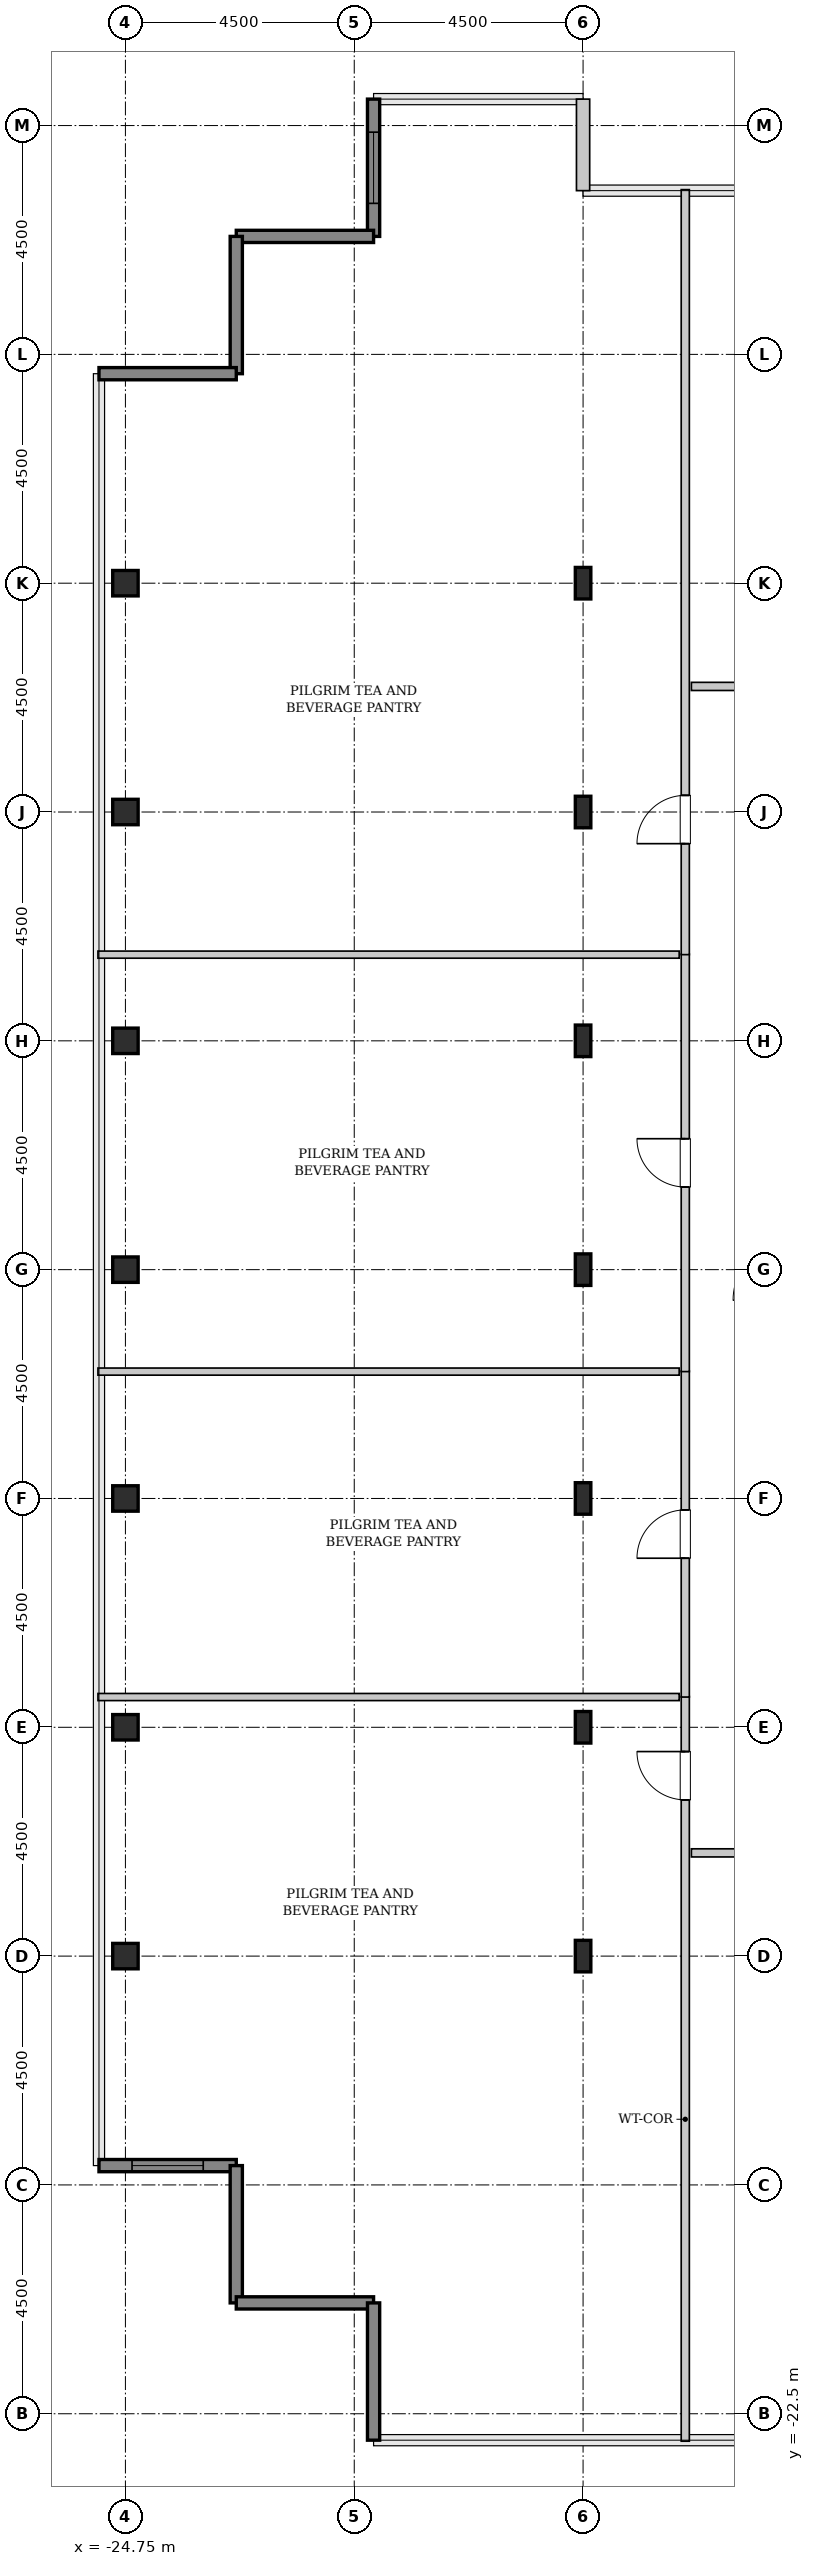
"""IFC4 building model, lengths in metres.
Left out: names, types, materials, properties, quantities, classifications, styles, units other than length and angle.
Written with IfcOpenShell. Run it as: python <this file> out.ifc"""

import sys

from ifc_helpers import new_model, si_unit, direction, frame, frame_2d, origin, origin_2d, place, context, subcontext, project, spatial, rectangle, hollow_rectangle, i_section, extrude, source, transform, mapped, element, fill, save


model = new_model("IFC4")
c1 = context("Model", 3, precision=1e-05, world=origin(), true_north=direction((0.0, 1.0)))
c2 = subcontext(c1, "Body", "Model", "MODEL_VIEW")
j1 = project(units=[si_unit("LENGTHUNIT", "METRE"), si_unit("PLANEANGLEUNIT", "RADIAN")], contexts=[c1])
p1 = place(None, origin())
s1 = spatial("IfcSite", under=j1, at=p1, CompositionType="ELEMENT")
p2 = place(p1, origin())
s2 = spatial("IfcBuilding", under=s1, at=p2, CompositionType="ELEMENT")
p3 = place(p2, frame((0.0, 0.0, 326.2)))
s3 = spatial("IfcBuildingStorey", under=s2, at=p3, CompositionType="ELEMENT", Elevation=326.2)
m1 = source(origin(), c2, "Body", "SweptSolid", [
    extrude(hollow_rectangle(XDim=0.5, YDim=0.5, WallThickness=0.025, InnerFilletRadius=0.025, OuterFilletRadius=0.05, at=origin_2d()), origin(), (0.0, 0.0, 1.0), 3.8),
])
for number, where, z_axis, x_axis in (
    (1, (-24.75, -13.5, 0.0), (0.0, 0.0, 1.0), (1.0, 0.0, 0.0)),
    (2, (-24.75, -9.0, 0.0), (0.0, 0.0, 1.0), (1.0, 0.0, 0.0)),
    (3, (-24.75, -4.5, 0.0), (0.0, 0.0, 1.0), (1.0, 0.0, 0.0)),
    (4, (-24.75, 0.0, 0.0), (0.0, 0.0, 1.0), (1.0, 0.0, 0.0)),
    (5, (-24.75, 4.5, 0.0), (0.0, 0.0, 1.0), (1.0, 0.0, 0.0)),
    (6, (-24.75, 9.0, 0.0), (0.0, 0.0, 1.0), (1.0, 0.0, 0.0)),
    (7, (-24.75, 13.5, 0.0), (0.0, 0.0, 1.0), (1.0, 0.0, 0.0)),
):
    element("IfcColumn", number, at=place(p3, frame(where, z_axis=z_axis, x_axis=x_axis)), inside=s3, PredefinedType="COLUMN", context=c2, shape_type="MappedRepresentation", body=[
        mapped(m1, transform((0.0, 0.0, 0.0), x_axis=(1.0, 0.0, 0.0), y_axis=(0.0, 1.0, 0.0), z_axis=(0.0, 0.0, 1.0), scale=1.0)),
    ])
m2 = source(origin(), c2, "Body", "SweptSolid", [
    extrude(i_section(OverallWidth=0.305, OverallDepth=0.62, WebThickness=0.021, FlangeThickness=0.04, FilletRadius=0.027, at=origin_2d()), origin(), (0.0, 0.0, 1.0), 3.8),
])
for number, where, z_axis, x_axis in (
    (8, (-15.75, -13.5, 0.0), (0.0, 0.0, 1.0), (1.0, 0.0, 0.0)),
    (9, (-15.75, -9.0, 0.0), (0.0, 0.0, 1.0), (1.0, 0.0, 0.0)),
    (10, (-15.75, -4.5, 0.0), (0.0, 0.0, 1.0), (1.0, 0.0, 0.0)),
    (11, (-15.75, 0.0, 0.0), (0.0, 0.0, 1.0), (1.0, 0.0, 0.0)),
    (12, (-15.75, 4.5, 0.0), (0.0, 0.0, 1.0), (1.0, 0.0, 0.0)),
    (13, (-15.75, 9.0, 0.0), (0.0, 0.0, 1.0), (1.0, 0.0, 0.0)),
    (14, (-15.75, 13.5, 0.0), (0.0, 0.0, 1.0), (1.0, 0.0, 0.0)),
):
    element("IfcColumn", number, at=place(p3, frame(where, z_axis=z_axis, x_axis=x_axis)), inside=s3, PredefinedType="COLUMN", context=c2, shape_type="MappedRepresentation", body=[
        mapped(m2, transform((0.0, 0.0, 0.0), x_axis=(1.0, 0.0, 0.0), y_axis=(0.0, 1.0, 0.0), z_axis=(0.0, 0.0, 1.0), scale=1.0)),
    ])
m3 = source(origin(), c2, "Body", "SweptSolid", [
    extrude(rectangle(XDim=1.8, YDim=0.26, at=frame_2d((0.9, 0.0))), origin(), (0.0, 0.0, 1.0), 3.55),
])
p4 = place(p3, frame((-15.75, 21.22, 0.0), z_axis=(0.0, 0.0, 1.0), x_axis=(0.0, 1.0, 0.0)))
e15 = element("IfcWall", 15, at=p4, inside=s3, PredefinedType="SOLIDWALL", context=c2, shape_type="MappedRepresentation", body=[
    mapped(m3, transform((0.0, 0.0, 0.0), x_axis=(1.0, 0.0, 0.0), y_axis=(0.0, 1.0, 0.0), z_axis=(0.0, 0.0, 1.0), scale=1.0)),
])
m4 = source(origin(), c2, "Body", "SweptSolid", [
    extrude(rectangle(XDim=2.7, YDim=0.24, at=frame_2d((1.35, 0.0))), origin(), (0.0, 0.0, 1.0), 3.55),
])
p5 = place(p3, frame((-19.87, 23.02, 0.0), z_axis=(0.0, 0.0, 1.0), x_axis=(0.0, -1.0, 0.0)))
e16 = element("IfcWall", 16, at=p5, inside=s3, PredefinedType="SHEAR", context=c2, shape_type="MappedRepresentation", body=[
    mapped(m4, transform((0.0, 0.0, 0.0), x_axis=(1.0, 0.0, 0.0), y_axis=(0.0, 1.0, 0.0), z_axis=(0.0, 0.0, 1.0), scale=1.0)),
])
p6 = place(p5, frame((0.65, 0.0, 0.85)))
e17 = element("IfcOpeningElement", 17, at=p6, cuts=e16, PredefinedType="OPENING", context=c2, shape_type="SweptSolid", body=[
    extrude(rectangle(XDim=1.4, YDim=1.8, at=frame_2d((0.7, 0.9))), frame((0.0, 0.13, 0.0), z_axis=(0.0, -1.0, 0.0), x_axis=(1.0, 0.0, 0.0)), (0.0, 0.0, 1.0), 0.26),
])
for number, where, z_axis, x_axis in (
    (18, (-19.87, 20.32, 0.0), (0.0, 0.0, 1.0), (-1.0, 0.0, 0.0)),
    (19, (-22.57, 20.32, 0.0), (0.0, 0.0, 1.0), (0.0, -1.0, 0.0)),
    (20, (-22.57, 17.62, 0.0), (0.0, 0.0, 1.0), (-1.0, 0.0, 0.0)),
):
    element("IfcWall", number, at=place(p3, frame(where, z_axis=z_axis, x_axis=x_axis)), inside=s3, PredefinedType="SHEAR", context=c2, shape_type="MappedRepresentation", body=[
        mapped(m4, transform((0.0, 0.0, 0.0), x_axis=(1.0, 0.0, 0.0), y_axis=(0.0, 1.0, 0.0), z_axis=(0.0, 0.0, 1.0), scale=1.0)),
    ])
p7 = place(p3, frame((-25.27, -17.62, 0.0), z_axis=(0.0, 0.0, 1.0), x_axis=(1.0, 0.0, 0.0)))
e21 = element("IfcWall", 21, at=p7, inside=s3, PredefinedType="SHEAR", context=c2, shape_type="MappedRepresentation", body=[
    mapped(m4, transform((0.0, 0.0, 0.0), x_axis=(1.0, 0.0, 0.0), y_axis=(0.0, 1.0, 0.0), z_axis=(0.0, 0.0, 1.0), scale=1.0)),
])
p8 = place(p7, frame((0.65, 0.0, 0.85)))
e22 = element("IfcOpeningElement", 22, at=p8, cuts=e21, PredefinedType="OPENING", context=c2, shape_type="SweptSolid", body=[
    extrude(rectangle(XDim=1.4, YDim=1.8, at=frame_2d((0.7, 0.9))), frame((0.0, 0.13, 0.0), z_axis=(0.0, -1.0, 0.0), x_axis=(1.0, 0.0, 0.0)), (0.0, 0.0, 1.0), 0.26),
])
for number, where, z_axis, x_axis in (
    (23, (-22.57, -17.62, 0.0), (0.0, 0.0, 1.0), (0.0, -1.0, 0.0)),
    (24, (-22.57, -20.32, 0.0), (0.0, 0.0, 1.0), (1.0, 0.0, 0.0)),
    (25, (-19.87, -20.32, 0.0), (0.0, 0.0, 1.0), (0.0, -1.0, 0.0)),
):
    element("IfcWall", number, at=place(p3, frame(where, z_axis=z_axis, x_axis=x_axis)), inside=s3, PredefinedType="SHEAR", context=c2, shape_type="MappedRepresentation", body=[
        mapped(m4, transform((0.0, 0.0, 0.0), x_axis=(1.0, 0.0, 0.0), y_axis=(0.0, 1.0, 0.0), z_axis=(0.0, 0.0, 1.0), scale=1.0)),
    ])
m5 = source(origin(), c2, "Body", "SweptSolid", [
    extrude(rectangle(XDim=14.645, YDim=0.16, at=frame_2d((7.323, 0.0))), origin(), (0.0, 0.0, 1.0), 3.535),
])
p9 = place(p3, frame((-13.74, -23.04, 0.0), z_axis=(0.0, 0.0, 1.0), x_axis=(0.0, 1.0, 0.0)))
e26 = element("IfcWall", 26, at=p9, inside=s3, PredefinedType="PARTITIONING", context=c2, shape_type="MappedRepresentation", body=[
    mapped(m5, transform((0.0, 0.0, 0.0), x_axis=(1.0, 0.0, 0.0), y_axis=(0.0, 1.0, 0.0), z_axis=(0.0, 0.0, 1.0), scale=1.0)),
])
p10 = place(p9, frame((12.613, 0.0, 0.0)))
e27 = element("IfcOpeningElement", 27, at=p10, cuts=e26, PredefinedType="OPENING", context=c2, shape_type="SweptSolid", body=[
    extrude(rectangle(XDim=0.95, YDim=2.1, at=frame_2d((0.475, 1.05))), frame((0.0, 0.09, 0.0), z_axis=(0.0, -1.0, 0.0), x_axis=(1.0, 0.0, 0.0)), (0.0, 0.0, 1.0), 0.18),
])
m6 = source(origin(), c2, "Body", "SweptSolid", [
    extrude(rectangle(XDim=11.43, YDim=0.14, at=frame_2d((5.715, 0.0))), origin(), (0.0, 0.0, 1.0), 3.535),
])
p11 = place(p3, frame((-25.29, -8.405, 0.0), z_axis=(0.0, 0.0, 1.0), x_axis=(1.0, 0.0, 0.0)))
e28 = element("IfcWall", 28, at=p11, inside=s3, PredefinedType="PARTITIONING", context=c2, shape_type="MappedRepresentation", body=[
    mapped(m6, transform((0.0, 0.0, 0.0), x_axis=(1.0, 0.0, 0.0), y_axis=(0.0, 1.0, 0.0), z_axis=(0.0, 0.0, 1.0), scale=1.0)),
])
m7 = source(origin(), c2, "Body", "SweptSolid", [
    extrude(rectangle(XDim=6.41, YDim=0.16, at=frame_2d((3.205, 0.0))), origin(), (0.0, 0.0, 1.0), 3.535),
])
p12 = place(p3, frame((-13.74, -8.405, 0.0), z_axis=(0.0, 0.0, 1.0), x_axis=(0.0, 1.0, 0.0)))
e29 = element("IfcWall", 29, at=p12, inside=s3, PredefinedType="PARTITIONING", context=c2, shape_type="MappedRepresentation", body=[
    mapped(m7, transform((0.0, 0.0, 0.0), x_axis=(1.0, 0.0, 0.0), y_axis=(0.0, 1.0, 0.0), z_axis=(0.0, 0.0, 1.0), scale=1.0)),
])
p13 = place(p12, frame((2.73, 0.0, 0.0)))
e30 = element("IfcOpeningElement", 30, at=p13, cuts=e29, PredefinedType="OPENING", context=c2, shape_type="SweptSolid", body=[
    extrude(rectangle(XDim=0.95, YDim=2.1, at=frame_2d((0.475, 1.05))), frame((0.0, 0.09, 0.0), z_axis=(0.0, -1.0, 0.0), x_axis=(1.0, 0.0, 0.0)), (0.0, 0.0, 1.0), 0.18),
])
p14 = place(p3, frame((-25.29, -2.005, 0.0), z_axis=(0.0, 0.0, 1.0), x_axis=(1.0, 0.0, 0.0)))
e31 = element("IfcWall", 31, at=p14, inside=s3, PredefinedType="PARTITIONING", context=c2, shape_type="MappedRepresentation", body=[
    mapped(m6, transform((0.0, 0.0, 0.0), x_axis=(1.0, 0.0, 0.0), y_axis=(0.0, 1.0, 0.0), z_axis=(0.0, 0.0, 1.0), scale=1.0)),
])
m8 = source(origin(), c2, "Body", "SweptSolid", [
    extrude(rectangle(XDim=8.21, YDim=0.16, at=frame_2d((4.105, 0.0))), origin(), (0.0, 0.0, 1.0), 3.535),
])
p15 = place(p3, frame((-13.74, -2.005, 0.0), z_axis=(0.0, 0.0, 1.0), x_axis=(0.0, 1.0, 0.0)))
e32 = element("IfcWall", 32, at=p15, inside=s3, PredefinedType="PARTITIONING", context=c2, shape_type="MappedRepresentation", body=[
    mapped(m8, transform((0.0, 0.0, 0.0), x_axis=(1.0, 0.0, 0.0), y_axis=(0.0, 1.0, 0.0), z_axis=(0.0, 0.0, 1.0), scale=1.0)),
])
p16 = place(p15, frame((3.63, 0.0, 0.0)))
e33 = element("IfcOpeningElement", 33, at=p16, cuts=e32, PredefinedType="OPENING", context=c2, shape_type="SweptSolid", body=[
    extrude(rectangle(XDim=0.95, YDim=2.1, at=frame_2d((0.475, 1.05))), frame((0.0, 0.09, 0.0), z_axis=(0.0, -1.0, 0.0), x_axis=(1.0, 0.0, 0.0)), (0.0, 0.0, 1.0), 0.18),
])
p17 = place(p3, frame((-25.29, 6.195, 0.0), z_axis=(0.0, 0.0, 1.0), x_axis=(1.0, 0.0, 0.0)))
e34 = element("IfcWall", 34, at=p17, inside=s3, PredefinedType="PARTITIONING", context=c2, shape_type="MappedRepresentation", body=[
    mapped(m6, transform((0.0, 0.0, 0.0), x_axis=(1.0, 0.0, 0.0), y_axis=(0.0, 1.0, 0.0), z_axis=(0.0, 0.0, 1.0), scale=1.0)),
])
m9 = source(origin(), c2, "Body", "SweptSolid", [
    extrude(rectangle(XDim=15.045, YDim=0.16, at=frame_2d((7.522, 0.0))), origin(), (0.0, 0.0, 1.0), 3.535),
])
p18 = place(p3, frame((-13.74, 6.195, 0.0), z_axis=(0.0, 0.0, 1.0), x_axis=(0.0, 1.0, 0.0)))
e35 = element("IfcWall", 35, at=p18, inside=s3, PredefinedType="PARTITIONING", context=c2, shape_type="MappedRepresentation", body=[
    mapped(m9, transform((0.0, 0.0, 0.0), x_axis=(1.0, 0.0, 0.0), y_axis=(0.0, 1.0, 0.0), z_axis=(0.0, 0.0, 1.0), scale=1.0)),
])
p19 = place(p18, frame((2.183, 0.0, 0.0)))
e36 = element("IfcOpeningElement", 36, at=p19, cuts=e35, PredefinedType="OPENING", context=c2, shape_type="SweptSolid", body=[
    extrude(rectangle(XDim=0.95, YDim=2.1, at=frame_2d((0.475, 1.05))), frame((0.0, 0.09, 0.0), z_axis=(0.0, -1.0, 0.0), x_axis=(1.0, 0.0, 0.0)), (0.0, 0.0, 1.0), 0.18),
])
m10 = source(origin(), c2, "Body", "SweptSolid", [
    extrude(rectangle(XDim=4.125, YDim=0.16, at=frame_2d((2.062, 0.0))), origin(), (0.0, 0.0, 1.0), 3.535),
])
p20 = place(p3, frame((-13.62, 11.47, 0.0), z_axis=(0.0, 0.0, 1.0), x_axis=(1.0, 0.0, 0.0)))
e37 = element("IfcWall", 37, at=p20, inside=s3, PredefinedType="PARTITIONING", context=c2, shape_type="MappedRepresentation", body=[
    mapped(m10, transform((0.0, 0.0, 0.0), x_axis=(1.0, 0.0, 0.0), y_axis=(0.0, 1.0, 0.0), z_axis=(0.0, 0.0, 1.0), scale=1.0)),
])
p21 = place(p20, frame((1.587, 0.0, 0.0)))
e38 = element("IfcOpeningElement", 38, at=p21, cuts=e37, PredefinedType="OPENING", context=c2, shape_type="SweptSolid", body=[
    extrude(rectangle(XDim=0.95, YDim=2.1, at=frame_2d((0.475, 1.05))), frame((0.0, 0.09, 0.0), z_axis=(0.0, -1.0, 0.0), x_axis=(1.0, 0.0, 0.0)), (0.0, 0.0, 1.0), 0.18),
])
m11 = source(origin(), c2, "Body", "SweptSolid", [
    extrude(rectangle(XDim=5.16, YDim=0.16, at=frame_2d((2.58, 0.0))), origin(), (0.0, 0.0, 1.0), 3.535),
])
p22 = place(p3, frame((-13.62, -11.47, 0.0), z_axis=(0.0, 0.0, 1.0), x_axis=(1.0, 0.0, 0.0)))
e39 = element("IfcWall", 39, at=p22, inside=s3, PredefinedType="PARTITIONING", context=c2, shape_type="MappedRepresentation", body=[
    mapped(m11, transform((0.0, 0.0, 0.0), x_axis=(1.0, 0.0, 0.0), y_axis=(0.0, 1.0, 0.0), z_axis=(0.0, 0.0, 1.0), scale=1.0)),
])
p23 = place(p22, frame((2.105, 0.0, 0.0)))
e40 = element("IfcOpeningElement", 40, at=p23, cuts=e39, PredefinedType="OPENING", context=c2, shape_type="SweptSolid", body=[
    extrude(rectangle(XDim=0.95, YDim=2.1, at=frame_2d((0.475, 1.05))), frame((0.0, 0.09, 0.0), z_axis=(0.0, -1.0, 0.0), x_axis=(1.0, 0.0, 0.0)), (0.0, 0.0, 1.0), 0.18),
])
m12 = source(origin(), c2, "Body", "SweptSolid", [
    extrude(rectangle(XDim=1.4, YDim=1.8, at=frame_2d((0.7, 0.9))), frame((0.0, 0.03, 0.0), z_axis=(0.0, -1.0, 0.0), x_axis=(1.0, 0.0, 0.0)), (0.0, 0.0, 1.0), 0.06),
])
p24 = place(p6, origin())
e41 = element("IfcWindow", 41, at=p24, inside=s3, PartitioningType="SINGLE_PANEL", PredefinedType="WINDOW", context=c2, shape_type="MappedRepresentation", body=[
    mapped(m12, transform((0.0, 0.0, 0.0), x_axis=(1.0, 0.0, 0.0), y_axis=(0.0, 1.0, 0.0), z_axis=(0.0, 0.0, 1.0), scale=1.0)),
])
fill(e17, e41)
p25 = place(p8, origin())
e42 = element("IfcWindow", 42, at=p25, inside=s3, PartitioningType="SINGLE_PANEL", PredefinedType="WINDOW", context=c2, shape_type="MappedRepresentation", body=[
    mapped(m12, transform((0.0, 0.0, 0.0), x_axis=(1.0, 0.0, 0.0), y_axis=(0.0, 1.0, 0.0), z_axis=(0.0, 0.0, 1.0), scale=1.0)),
])
fill(e22, e42)
m13 = source(origin(), c2, "Body", "SweptSolid", [
    extrude(rectangle(XDim=0.95, YDim=2.1, at=frame_2d((0.475, 1.05))), frame((0.0, 0.025, 0.0), z_axis=(0.0, -1.0, 0.0), x_axis=(1.0, 0.0, 0.0)), (0.0, 0.0, 1.0), 0.05),
])
p26 = place(p10, origin())
e43 = element("IfcDoor", 43, at=p26, inside=s3, OperationType="SINGLE_SWING_RIGHT", PredefinedType="DOOR", context=c2, shape_type="MappedRepresentation", body=[
    mapped(m13, transform((0.0, 0.0, 0.0), x_axis=(1.0, 0.0, 0.0), y_axis=(0.0, 1.0, 0.0), z_axis=(0.0, 0.0, 1.0), scale=1.0)),
])
fill(e27, e43)
p27 = place(p13, origin())
e44 = element("IfcDoor", 44, at=p27, inside=s3, OperationType="SINGLE_SWING_LEFT", PredefinedType="DOOR", context=c2, shape_type="MappedRepresentation", body=[
    mapped(m13, transform((0.0, 0.0, 0.0), x_axis=(1.0, 0.0, 0.0), y_axis=(0.0, 1.0, 0.0), z_axis=(0.0, 0.0, 1.0), scale=1.0)),
])
fill(e30, e44)
p28 = place(p16, origin())
e45 = element("IfcDoor", 45, at=p28, inside=s3, OperationType="SINGLE_SWING_RIGHT", PredefinedType="DOOR", context=c2, shape_type="MappedRepresentation", body=[
    mapped(m13, transform((0.0, 0.0, 0.0), x_axis=(1.0, 0.0, 0.0), y_axis=(0.0, 1.0, 0.0), z_axis=(0.0, 0.0, 1.0), scale=1.0)),
])
fill(e33, e45)
p29 = place(p19, origin())
e46 = element("IfcDoor", 46, at=p29, inside=s3, OperationType="SINGLE_SWING_LEFT", PredefinedType="DOOR", context=c2, shape_type="MappedRepresentation", body=[
    mapped(m13, transform((0.0, 0.0, 0.0), x_axis=(1.0, 0.0, 0.0), y_axis=(0.0, 1.0, 0.0), z_axis=(0.0, 0.0, 1.0), scale=1.0)),
])
fill(e36, e46)
save(model, sys.argv[1])
